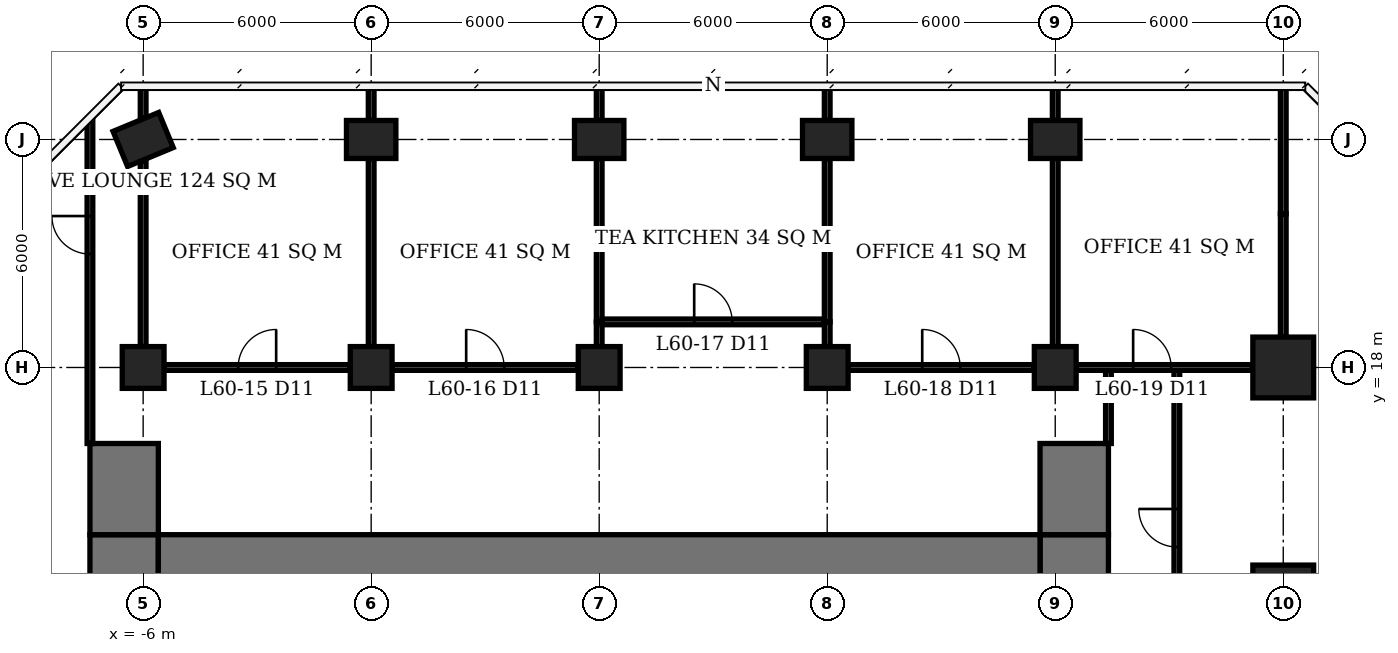
"""IFC4 building model, lengths in metres.
Left out: names, types, materials, properties, quantities, classifications, styles, units other than length and angle.
Written with IfcOpenShell. Run it as: python <this file> out.ifc"""

import sys

from ifc_helpers import new_model, si_unit, direction, frame, frame_2d, origin, origin_2d, place, context, subcontext, project, spatial, rectangle, extrude, element, fill, save


model = new_model("IFC4")
c1 = context("Model", 3, precision=1e-05, world=origin(), true_north=direction((0.0, 1.0)))
c2 = subcontext(c1, "Body", "Model", "MODEL_VIEW")
j1 = project(units=[si_unit("LENGTHUNIT", "METRE"), si_unit("PLANEANGLEUNIT", "RADIAN")], contexts=[c1])
p1 = place(None, origin())
s1 = spatial("IfcSite", under=j1, at=p1, CompositionType="ELEMENT")
p2 = place(p1, origin())
s2 = spatial("IfcBuilding", under=s1, at=p2, CompositionType="ELEMENT")
p3 = place(p2, frame((0.0, 0.0, 245.0)))
s3 = spatial("IfcBuildingStorey", under=s2, at=p3, CompositionType="ELEMENT", Elevation=245.0)
p4 = place(p3, frame((-6.0, 18.0, 0.0), z_axis=(0.0, 0.0, 1.0), x_axis=(1.0, 0.0, 0.0)))
e1 = element("IfcColumn", 1, at=p4, inside=s3, PredefinedType="COLUMN", context=c2, shape_type="SweptSolid", body=[
    extrude(rectangle(XDim=1.1, YDim=1.1, at=origin_2d()), origin(), (0.0, 0.0, 1.0), 3.9),
])
p5 = place(p3, frame((-6.0, 24.0, 0.0), z_axis=(0.0, 0.0, 1.0), x_axis=(0.923879532511, 0.382683432365, 0.0)))
e2 = element("IfcColumn", 2, at=p5, inside=s3, PredefinedType="COLUMN", context=c2, shape_type="SweptSolid", body=[
    extrude(rectangle(XDim=1.3, YDim=1.0, at=origin_2d()), origin(), (0.0, 0.0, 1.0), 3.9),
])
p6 = place(p3, frame((0.0, 18.0, 0.0), z_axis=(0.0, 0.0, 1.0), x_axis=(1.0, 0.0, 0.0)))
e3 = element("IfcColumn", 3, at=p6, inside=s3, PredefinedType="COLUMN", context=c2, shape_type="SweptSolid", body=[
    extrude(rectangle(XDim=1.1, YDim=1.1, at=origin_2d()), origin(), (0.0, 0.0, 1.0), 3.9),
])
p7 = place(p3, frame((0.0, 24.0, 0.0), z_axis=(0.0, 0.0, 1.0), x_axis=(1.0, 0.0, 0.0)))
e4 = element("IfcColumn", 4, at=p7, inside=s3, PredefinedType="COLUMN", context=c2, shape_type="SweptSolid", body=[
    extrude(rectangle(XDim=1.3, YDim=1.0, at=origin_2d()), origin(), (0.0, 0.0, 1.0), 3.9),
])
p8 = place(p3, frame((6.0, 18.0, 0.0), z_axis=(0.0, 0.0, 1.0), x_axis=(1.0, 0.0, 0.0)))
e5 = element("IfcColumn", 5, at=p8, inside=s3, PredefinedType="COLUMN", context=c2, shape_type="SweptSolid", body=[
    extrude(rectangle(XDim=1.1, YDim=1.1, at=origin_2d()), origin(), (0.0, 0.0, 1.0), 3.9),
])
p9 = place(p3, frame((6.0, 24.0, 0.0), z_axis=(0.0, 0.0, 1.0), x_axis=(1.0, 0.0, 0.0)))
e6 = element("IfcColumn", 6, at=p9, inside=s3, PredefinedType="COLUMN", context=c2, shape_type="SweptSolid", body=[
    extrude(rectangle(XDim=1.3, YDim=1.0, at=origin_2d()), origin(), (0.0, 0.0, 1.0), 3.9),
])
p10 = place(p3, frame((12.0, 18.0, 0.0), z_axis=(0.0, 0.0, 1.0), x_axis=(1.0, 0.0, 0.0)))
e7 = element("IfcColumn", 7, at=p10, inside=s3, PredefinedType="COLUMN", context=c2, shape_type="SweptSolid", body=[
    extrude(rectangle(XDim=1.1, YDim=1.1, at=origin_2d()), origin(), (0.0, 0.0, 1.0), 3.9),
])
p11 = place(p3, frame((12.0, 24.0, 0.0), z_axis=(0.0, 0.0, 1.0), x_axis=(1.0, 0.0, 0.0)))
e8 = element("IfcColumn", 8, at=p11, inside=s3, PredefinedType="COLUMN", context=c2, shape_type="SweptSolid", body=[
    extrude(rectangle(XDim=1.3, YDim=1.0, at=origin_2d()), origin(), (0.0, 0.0, 1.0), 3.9),
])
p12 = place(p3, frame((18.0, 18.0, 0.0), z_axis=(0.0, 0.0, 1.0), x_axis=(1.0, 0.0, 0.0)))
e9 = element("IfcColumn", 9, at=p12, inside=s3, PredefinedType="COLUMN", context=c2, shape_type="SweptSolid", body=[
    extrude(rectangle(XDim=1.1, YDim=1.1, at=origin_2d()), origin(), (0.0, 0.0, 1.0), 3.9),
])
p13 = place(p3, frame((18.0, 24.0, 0.0), z_axis=(0.0, 0.0, 1.0), x_axis=(1.0, 0.0, 0.0)))
e10 = element("IfcColumn", 10, at=p13, inside=s3, PredefinedType="COLUMN", context=c2, shape_type="SweptSolid", body=[
    extrude(rectangle(XDim=1.3, YDim=1.0, at=origin_2d()), origin(), (0.0, 0.0, 1.0), 3.9),
])
for number, where, z_axis, x_axis in (
    (11, (24.0, 12.0, 0.0), (0.0, 0.0, 1.0), (1.0, 0.0, 0.0)),
    (12, (24.0, 18.0, 0.0), (0.0, 0.0, 1.0), (1.0, 0.0, 0.0)),
):
    element("IfcColumn", number, at=place(p3, frame(where, z_axis=z_axis, x_axis=x_axis)), inside=s3, PredefinedType="COLUMN", context=c2, shape_type="SweptSolid", body=[
        extrude(rectangle(XDim=1.6, YDim=1.6, at=origin_2d()), origin(), (0.0, 0.0, 1.0), 3.9),
    ])
p14 = place(p3, frame((-5.6, 12.6, 0.0), z_axis=(0.0, 0.0, 1.0), x_axis=(1.0, 0.0, 0.0)))
e13 = element("IfcWall", 13, at=p14, inside=s3, PredefinedType="SHEAR", context=c2, shape_type="SweptSolid", body=[
    extrude(rectangle(XDim=23.2, YDim=2.0, at=frame_2d((11.6, 0.0))), origin(), (0.0, 0.0, 1.0), 3.9),
])
p15 = place(p3, frame((-6.5, -7.6, 0.0), z_axis=(0.0, 0.0, 1.0), x_axis=(0.0, 1.0, 0.0)))
e14 = element("IfcWall", 14, at=p15, inside=s3, PredefinedType="SHEAR", context=c2, shape_type="SweptSolid", body=[
    extrude(rectangle(XDim=21.2, YDim=1.8, at=frame_2d((10.6, 0.0))), origin(), (0.0, 0.0, 1.0), 3.9),
])
p16 = place(p15, frame((7.8, 0.0, 0.0)))
e15 = element("IfcOpeningElement", 15, at=p16, cuts=e14, PredefinedType="OPENING", context=c2, shape_type="SweptSolid", body=[
    extrude(rectangle(XDim=1.8, YDim=2.4, at=frame_2d((0.9, 1.2))), frame((0.0, 0.91, 0.0), z_axis=(0.0, -1.0, 0.0), x_axis=(1.0, 0.0, 0.0)), (0.0, 0.0, 1.0), 1.82),
])
p17 = place(p3, frame((18.5, -7.6, 0.0), z_axis=(0.0, 0.0, 1.0), x_axis=(0.0, 1.0, 0.0)))
e16 = element("IfcWall", 16, at=p17, inside=s3, PredefinedType="SHEAR", context=c2, shape_type="SweptSolid", body=[
    extrude(rectangle(XDim=21.2, YDim=1.8, at=frame_2d((10.6, 0.0))), origin(), (0.0, 0.0, 1.0), 3.9),
])
p18 = place(p17, frame((9.2, 0.0, 0.0)))
e17 = element("IfcOpeningElement", 17, at=p18, cuts=e16, PredefinedType="OPENING", context=c2, shape_type="SweptSolid", body=[
    extrude(rectangle(XDim=1.8, YDim=2.4, at=frame_2d((0.9, 1.2))), frame((0.0, 0.91, 0.0), z_axis=(0.0, -1.0, 0.0), x_axis=(1.0, 0.0, 0.0)), (0.0, 0.0, 1.0), 1.82),
])
for number, where, z_axis, x_axis in (
    (18, (-6.5, 13.6, 0.0), (0.0, 0.0, 1.0), (0.0, 1.0, 0.0)),
    (19, (18.5, 13.6, 0.0), (0.0, 0.0, 1.0), (0.0, 1.0, 0.0)),
):
    element("IfcWall", number, at=place(p3, frame(where, z_axis=z_axis, x_axis=x_axis)), inside=s3, PredefinedType="SHEAR", context=c2, shape_type="SweptSolid", body=[
        extrude(rectangle(XDim=2.4, YDim=1.8, at=frame_2d((1.2, 0.0))), origin(), (0.0, 0.0, 1.0), 3.9),
    ])
p19 = place(p3, frame((-5.45, 18.0, 0.0), z_axis=(0.0, 0.0, 1.0), x_axis=(1.0, 0.0, 0.0)))
e20 = element("IfcWall", 20, at=p19, inside=s3, PredefinedType="PARTITIONING", context=c2, shape_type="SweptSolid", body=[
    extrude(rectangle(XDim=4.9, YDim=0.15, at=frame_2d((2.45, 0.0))), origin(), (0.0, 0.0, 1.0), 3.65),
])
p20 = place(p19, frame((1.95, 0.0, 0.0)))
e21 = element("IfcOpeningElement", 21, at=p20, cuts=e20, PredefinedType="OPENING", context=c2, shape_type="SweptSolid", body=[
    extrude(rectangle(XDim=1.0, YDim=2.4, at=frame_2d((0.5, 1.2))), frame((0.0, 0.085, 0.0), z_axis=(0.0, -1.0, 0.0), x_axis=(1.0, 0.0, 0.0)), (0.0, 0.0, 1.0), 0.17),
])
p21 = place(p3, frame((0.55, 18.0, 0.0), z_axis=(0.0, 0.0, 1.0), x_axis=(1.0, 0.0, 0.0)))
e22 = element("IfcWall", 22, at=p21, inside=s3, PredefinedType="PARTITIONING", context=c2, shape_type="SweptSolid", body=[
    extrude(rectangle(XDim=4.9, YDim=0.15, at=frame_2d((2.45, 0.0))), origin(), (0.0, 0.0, 1.0), 3.65),
])
p22 = place(p21, frame((1.95, 0.0, 0.0)))
e23 = element("IfcOpeningElement", 23, at=p22, cuts=e22, PredefinedType="OPENING", context=c2, shape_type="SweptSolid", body=[
    extrude(rectangle(XDim=1.0, YDim=2.4, at=frame_2d((0.5, 1.2))), frame((0.0, 0.085, 0.0), z_axis=(0.0, -1.0, 0.0), x_axis=(1.0, 0.0, 0.0)), (0.0, 0.0, 1.0), 0.17),
])
p23 = place(p3, frame((12.55, 18.0, 0.0), z_axis=(0.0, 0.0, 1.0), x_axis=(1.0, 0.0, 0.0)))
e24 = element("IfcWall", 24, at=p23, inside=s3, PredefinedType="PARTITIONING", context=c2, shape_type="SweptSolid", body=[
    extrude(rectangle(XDim=4.9, YDim=0.15, at=frame_2d((2.45, 0.0))), origin(), (0.0, 0.0, 1.0), 3.65),
])
p24 = place(p23, frame((1.95, 0.0, 0.0)))
e25 = element("IfcOpeningElement", 25, at=p24, cuts=e24, PredefinedType="OPENING", context=c2, shape_type="SweptSolid", body=[
    extrude(rectangle(XDim=1.0, YDim=2.4, at=frame_2d((0.5, 1.2))), frame((0.0, 0.085, 0.0), z_axis=(0.0, -1.0, 0.0), x_axis=(1.0, 0.0, 0.0)), (0.0, 0.0, 1.0), 0.17),
])
p25 = place(p3, frame((18.55, 18.0, 0.0), z_axis=(0.0, 0.0, 1.0), x_axis=(1.0, 0.0, 0.0)))
e26 = element("IfcWall", 26, at=p25, inside=s3, PredefinedType="PARTITIONING", context=c2, shape_type="SweptSolid", body=[
    extrude(rectangle(XDim=4.64, YDim=0.15, at=frame_2d((2.32, 0.0))), origin(), (0.0, 0.0, 1.0), 3.65),
])
p26 = place(p25, frame((1.5, 0.0, 0.0)))
e27 = element("IfcOpeningElement", 27, at=p26, cuts=e26, PredefinedType="OPENING", context=c2, shape_type="SweptSolid", body=[
    extrude(rectangle(XDim=1.0, YDim=2.4, at=frame_2d((0.5, 1.2))), frame((0.0, 0.085, 0.0), z_axis=(0.0, -1.0, 0.0), x_axis=(1.0, 0.0, 0.0)), (0.0, 0.0, 1.0), 0.17),
])
p27 = place(p3, frame((6.075, 19.2, 0.0), z_axis=(0.0, 0.0, 1.0), x_axis=(1.0, 0.0, 0.0)))
e28 = element("IfcWall", 28, at=p27, inside=s3, PredefinedType="PARTITIONING", context=c2, shape_type="SweptSolid", body=[
    extrude(rectangle(XDim=5.85, YDim=0.15, at=frame_2d((2.925, 0.0))), origin(), (0.0, 0.0, 1.0), 3.65),
])
p28 = place(p27, frame((2.425, 0.0, 0.0)))
e29 = element("IfcOpeningElement", 29, at=p28, cuts=e28, PredefinedType="OPENING", context=c2, shape_type="SweptSolid", body=[
    extrude(rectangle(XDim=1.0, YDim=2.4, at=frame_2d((0.5, 1.2))), frame((0.0, 0.085, 0.0), z_axis=(0.0, -1.0, 0.0), x_axis=(1.0, 0.0, 0.0)), (0.0, 0.0, 1.0), 0.17),
])
p29 = place(p3, frame((-6.0, 18.55, 0.0), z_axis=(0.0, 0.0, 1.0), x_axis=(0.0, 1.0, 0.0)))
e30 = element("IfcWall", 30, at=p29, inside=s3, PredefinedType="PARTITIONING", context=c2, shape_type="SweptSolid", body=[
    extrude(rectangle(XDim=4.878, YDim=0.15, at=frame_2d((2.439, 0.0))), origin(), (0.0, 0.0, 1.0), 3.65),
])
p30 = place(p3, frame((-6.0, 24.572, 0.0), z_axis=(0.0, 0.0, 1.0), x_axis=(0.0, 1.0, 0.0)))
e31 = element("IfcWall", 31, at=p30, inside=s3, PredefinedType="PARTITIONING", context=c2, shape_type="SweptSolid", body=[
    extrude(rectangle(XDim=0.803, YDim=0.15, at=frame_2d((0.401, 0.0))), origin(), (0.0, 0.0, 1.0), 3.65),
])
p31 = place(p3, frame((0.0, 18.55, 0.0), z_axis=(0.0, 0.0, 1.0), x_axis=(0.0, 1.0, 0.0)))
e32 = element("IfcWall", 32, at=p31, inside=s3, PredefinedType="PARTITIONING", context=c2, shape_type="SweptSolid", body=[
    extrude(rectangle(XDim=4.95, YDim=0.15, at=frame_2d((2.475, 0.0))), origin(), (0.0, 0.0, 1.0), 3.65),
])
p32 = place(p3, frame((0.0, 24.5, 0.0), z_axis=(0.0, 0.0, 1.0), x_axis=(0.0, 1.0, 0.0)))
e33 = element("IfcWall", 33, at=p32, inside=s3, PredefinedType="PARTITIONING", context=c2, shape_type="SweptSolid", body=[
    extrude(rectangle(XDim=0.875, YDim=0.15, at=frame_2d((0.438, 0.0))), origin(), (0.0, 0.0, 1.0), 3.65),
])
p33 = place(p3, frame((6.0, 18.55, 0.0), z_axis=(0.0, 0.0, 1.0), x_axis=(0.0, 1.0, 0.0)))
e34 = element("IfcWall", 34, at=p33, inside=s3, PredefinedType="PARTITIONING", context=c2, shape_type="SweptSolid", body=[
    extrude(rectangle(XDim=0.65, YDim=0.15, at=frame_2d((0.325, 0.0))), origin(), (0.0, 0.0, 1.0), 3.65),
])
p34 = place(p3, frame((6.0, 19.2, 0.0), z_axis=(0.0, 0.0, 1.0), x_axis=(0.0, 1.0, 0.0)))
e35 = element("IfcWall", 35, at=p34, inside=s3, PredefinedType="PARTITIONING", context=c2, shape_type="SweptSolid", body=[
    extrude(rectangle(XDim=4.3, YDim=0.15, at=frame_2d((2.15, 0.0))), origin(), (0.0, 0.0, 1.0), 3.65),
])
p35 = place(p3, frame((6.0, 24.5, 0.0), z_axis=(0.0, 0.0, 1.0), x_axis=(0.0, 1.0, 0.0)))
e36 = element("IfcWall", 36, at=p35, inside=s3, PredefinedType="PARTITIONING", context=c2, shape_type="SweptSolid", body=[
    extrude(rectangle(XDim=0.85, YDim=0.15, at=frame_2d((0.425, 0.0))), origin(), (0.0, 0.0, 1.0), 3.65),
])
p36 = place(p3, frame((12.0, 18.55, 0.0), z_axis=(0.0, 0.0, 1.0), x_axis=(0.0, 1.0, 0.0)))
e37 = element("IfcWall", 37, at=p36, inside=s3, PredefinedType="PARTITIONING", context=c2, shape_type="SweptSolid", body=[
    extrude(rectangle(XDim=0.65, YDim=0.15, at=frame_2d((0.325, 0.0))), origin(), (0.0, 0.0, 1.0), 3.65),
])
p37 = place(p3, frame((12.0, 19.2, 0.0), z_axis=(0.0, 0.0, 1.0), x_axis=(0.0, 1.0, 0.0)))
e38 = element("IfcWall", 38, at=p37, inside=s3, PredefinedType="PARTITIONING", context=c2, shape_type="SweptSolid", body=[
    extrude(rectangle(XDim=4.3, YDim=0.15, at=frame_2d((2.15, 0.0))), origin(), (0.0, 0.0, 1.0), 3.65),
])
p38 = place(p3, frame((12.0, 24.5, 0.0), z_axis=(0.0, 0.0, 1.0), x_axis=(0.0, 1.0, 0.0)))
e39 = element("IfcWall", 39, at=p38, inside=s3, PredefinedType="PARTITIONING", context=c2, shape_type="SweptSolid", body=[
    extrude(rectangle(XDim=0.85, YDim=0.15, at=frame_2d((0.425, 0.0))), origin(), (0.0, 0.0, 1.0), 3.65),
])
p39 = place(p3, frame((18.0, 18.55, 0.0), z_axis=(0.0, 0.0, 1.0), x_axis=(0.0, 1.0, 0.0)))
e40 = element("IfcWall", 40, at=p39, inside=s3, PredefinedType="PARTITIONING", context=c2, shape_type="SweptSolid", body=[
    extrude(rectangle(XDim=4.95, YDim=0.15, at=frame_2d((2.475, 0.0))), origin(), (0.0, 0.0, 1.0), 3.65),
])
p40 = place(p3, frame((18.0, 24.5, 0.0), z_axis=(0.0, 0.0, 1.0), x_axis=(0.0, 1.0, 0.0)))
e41 = element("IfcWall", 41, at=p40, inside=s3, PredefinedType="PARTITIONING", context=c2, shape_type="SweptSolid", body=[
    extrude(rectangle(XDim=0.875, YDim=0.15, at=frame_2d((0.438, 0.0))), origin(), (0.0, 0.0, 1.0), 3.65),
])
p41 = place(p3, frame((24.0, 18.8, 0.0), z_axis=(0.0, 0.0, 1.0), x_axis=(0.0, 1.0, 0.0)))
e42 = element("IfcWall", 42, at=p41, inside=s3, PredefinedType="PARTITIONING", context=c2, shape_type="SweptSolid", body=[
    extrude(rectangle(XDim=3.245, YDim=0.15, at=frame_2d((1.623, 0.0))), origin(), (0.0, 0.0, 1.0), 2.65),
])
p42 = place(p3, frame((24.0, 22.045, 0.0), z_axis=(0.0, 0.0, 1.0), x_axis=(0.0, 1.0, 0.0)))
e43 = element("IfcWall", 43, at=p42, inside=s3, PredefinedType="PARTITIONING", context=c2, shape_type="SweptSolid", body=[
    extrude(rectangle(XDim=3.33, YDim=0.15, at=frame_2d((1.665, 0.0))), origin(), (0.0, 0.0, 1.0), 3.65),
])
p43 = place(p3, frame((-7.4, 16.0, 0.0), z_axis=(0.0, 0.0, 1.0), x_axis=(0.0, 1.0, 0.0)))
e44 = element("IfcWall", 44, at=p43, inside=s3, PredefinedType="PARTITIONING", context=c2, shape_type="SweptSolid", body=[
    extrude(rectangle(XDim=8.489, YDim=0.15, at=frame_2d((4.245, 0.0))), origin(), (0.0, 0.0, 1.0), 3.65),
])
p44 = place(p43, frame((4.985, 0.0, 0.0)))
e45 = element("IfcOpeningElement", 45, at=p44, cuts=e44, PredefinedType="OPENING", context=c2, shape_type="SweptSolid", body=[
    extrude(rectangle(XDim=1.0, YDim=2.4, at=frame_2d((0.5, 1.2))), frame((0.0, 0.085, 0.0), z_axis=(0.0, -1.0, 0.0), x_axis=(1.0, 0.0, 0.0)), (0.0, 0.0, 1.0), 0.17),
])
p45 = place(p3, frame((19.4, 16.0, 0.0), z_axis=(0.0, 0.0, 1.0), x_axis=(0.0, 1.0, 0.0)))
e46 = element("IfcWall", 46, at=p45, inside=s3, PredefinedType="PARTITIONING", context=c2, shape_type="SweptSolid", body=[
    extrude(rectangle(XDim=1.925, YDim=0.15, at=frame_2d((0.962, 0.0))), origin(), (0.0, 0.0, 1.0), 3.65),
])
p46 = place(p3, frame((21.2, 6.075, 0.0), z_axis=(0.0, 0.0, 1.0), x_axis=(0.0, 1.0, 0.0)))
e47 = element("IfcWall", 47, at=p46, inside=s3, PredefinedType="PARTITIONING", context=c2, shape_type="SweptSolid", body=[
    extrude(rectangle(XDim=11.85, YDim=0.15, at=frame_2d((5.925, 0.0))), origin(), (0.0, 0.0, 1.0), 3.65),
])
p47 = place(p46, frame((7.202, 0.0, 0.0)))
e48 = element("IfcOpeningElement", 48, at=p47, cuts=e47, PredefinedType="OPENING", context=c2, shape_type="SweptSolid", body=[
    extrude(rectangle(XDim=1.0, YDim=2.4, at=frame_2d((0.5, 1.2))), frame((0.0, 0.085, 0.0), z_axis=(0.0, -1.0, 0.0), x_axis=(1.0, 0.0, 0.0)), (0.0, 0.0, 1.0), 0.17),
])
p48 = place(p20, origin())
e49 = element("IfcDoor", 49, at=p48, inside=s3, OperationType="SINGLE_SWING_RIGHT", PredefinedType="DOOR", context=c2, shape_type="SweptSolid", body=[
    extrude(rectangle(XDim=1.0, YDim=2.4, at=frame_2d((0.5, 1.2))), frame((0.0, 0.025, 0.0), z_axis=(0.0, -1.0, 0.0), x_axis=(1.0, 0.0, 0.0)), (0.0, 0.0, 1.0), 0.05),
])
fill(e21, e49)
p49 = place(p22, origin())
e50 = element("IfcDoor", 50, at=p49, inside=s3, OperationType="SINGLE_SWING_LEFT", PredefinedType="DOOR", context=c2, shape_type="SweptSolid", body=[
    extrude(rectangle(XDim=1.0, YDim=2.4, at=frame_2d((0.5, 1.2))), frame((0.0, 0.025, 0.0), z_axis=(0.0, -1.0, 0.0), x_axis=(1.0, 0.0, 0.0)), (0.0, 0.0, 1.0), 0.05),
])
fill(e23, e50)
p50 = place(p28, origin())
e51 = element("IfcDoor", 51, at=p50, inside=s3, OperationType="SINGLE_SWING_LEFT", PredefinedType="DOOR", context=c2, shape_type="SweptSolid", body=[
    extrude(rectangle(XDim=1.0, YDim=2.4, at=frame_2d((0.5, 1.2))), frame((0.0, 0.025, 0.0), z_axis=(0.0, -1.0, 0.0), x_axis=(1.0, 0.0, 0.0)), (0.0, 0.0, 1.0), 0.05),
])
fill(e29, e51)
p51 = place(p24, origin())
e52 = element("IfcDoor", 52, at=p51, inside=s3, OperationType="SINGLE_SWING_LEFT", PredefinedType="DOOR", context=c2, shape_type="SweptSolid", body=[
    extrude(rectangle(XDim=1.0, YDim=2.4, at=frame_2d((0.5, 1.2))), frame((0.0, 0.025, 0.0), z_axis=(0.0, -1.0, 0.0), x_axis=(1.0, 0.0, 0.0)), (0.0, 0.0, 1.0), 0.05),
])
fill(e25, e52)
p52 = place(p26, origin())
e53 = element("IfcDoor", 53, at=p52, inside=s3, OperationType="SINGLE_SWING_LEFT", PredefinedType="DOOR", context=c2, shape_type="SweptSolid", body=[
    extrude(rectangle(XDim=1.0, YDim=2.4, at=frame_2d((0.5, 1.2))), frame((0.0, 0.025, 0.0), z_axis=(0.0, -1.0, 0.0), x_axis=(1.0, 0.0, 0.0)), (0.0, 0.0, 1.0), 0.05),
])
fill(e27, e53)
p53 = place(p47, origin())
e54 = element("IfcDoor", 54, at=p53, inside=s3, OperationType="SINGLE_SWING_RIGHT", PredefinedType="DOOR", context=c2, shape_type="SweptSolid", body=[
    extrude(rectangle(XDim=1.0, YDim=2.4, at=frame_2d((0.5, 1.2))), frame((0.0, 0.025, 0.0), z_axis=(0.0, -1.0, 0.0), x_axis=(1.0, 0.0, 0.0)), (0.0, 0.0, 1.0), 0.05),
])
fill(e48, e54)
p54 = place(p44, origin())
e55 = element("IfcDoor", 55, at=p54, inside=s3, OperationType="SINGLE_SWING_RIGHT", PredefinedType="DOOR", context=c2, shape_type="SweptSolid", body=[
    extrude(rectangle(XDim=1.0, YDim=2.4, at=frame_2d((0.5, 1.2))), frame((0.0, 0.025, 0.0), z_axis=(0.0, -1.0, 0.0), x_axis=(1.0, 0.0, 0.0)), (0.0, 0.0, 1.0), 0.05),
])
fill(e45, e55)
save(model, sys.argv[1])
